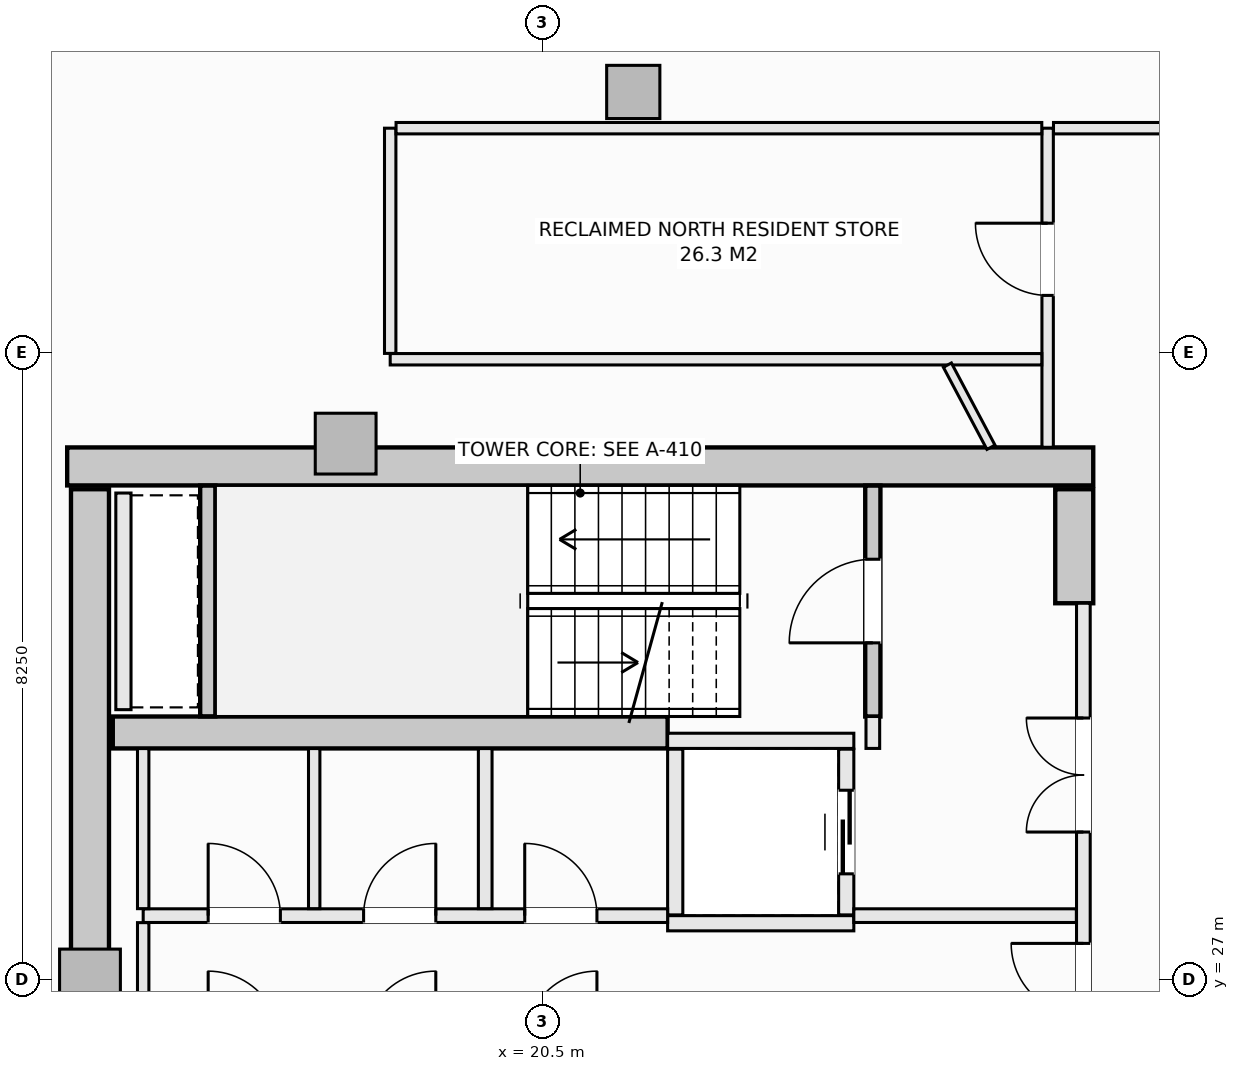
"""IFC4 building model, lengths in metres.
Left out: names, types, materials, properties, quantities, classifications, styles, units other than length and angle.
Written with IfcOpenShell. Run it as: python <this file> out.ifc"""

import sys

from ifc_helpers import new_model, si_unit, direction, frame, frame_2d, origin, origin_2d, place, context, subcontext, project, spatial, rectangle, extrude, element, fill, save


model = new_model("IFC4")
c1 = context("Model", 3, precision=1e-05, world=origin(), true_north=direction((0.0, 1.0)))
c2 = subcontext(c1, "Body", "Model", "MODEL_VIEW")
j1 = project(units=[si_unit("LENGTHUNIT", "METRE"), si_unit("PLANEANGLEUNIT", "RADIAN")], contexts=[c1])
p1 = place(None, origin())
s1 = spatial("IfcSite", under=j1, at=p1, CompositionType="ELEMENT")
p2 = place(p1, origin())
s2 = spatial("IfcBuilding", under=s1, at=p2, CompositionType="ELEMENT")
p3 = place(p2, frame((0.0, 0.0, 216.2)))
s3 = spatial("IfcBuildingStorey", under=s2, at=p3, CompositionType="ELEMENT", Elevation=216.2)
p4 = place(p3, frame((14.25, 33.75, -0.27), z_axis=(0.0, 0.0, 1.0), x_axis=(1.0, 0.0, 0.0)))
e1 = element("IfcWall", 1, at=p4, inside=s3, PredefinedType="SHEAR", context=c2, shape_type="SweptSolid", body=[
    extrude(rectangle(XDim=13.5, YDim=0.5, at=frame_2d((6.75, 0.0))), origin(), (0.0, 0.0, 1.0), 3.3),
])
p5 = place(p3, frame((14.55, 20.55, -0.27), z_axis=(0.0, 0.0, 1.0), x_axis=(0.0, 1.0, 0.0)))
e2 = element("IfcWall", 2, at=p5, inside=s3, PredefinedType="SHEAR", context=c2, shape_type="SweptSolid", body=[
    extrude(rectangle(XDim=12.9, YDim=0.5, at=frame_2d((6.45, 0.0))), origin(), (0.0, 0.0, 1.0), 3.3),
])
p6 = place(p3, frame((27.5, 31.95, -0.27), z_axis=(0.0, 0.0, 1.0), x_axis=(0.0, 1.0, 0.0)))
e3 = element("IfcWall", 3, at=p6, inside=s3, PredefinedType="SHEAR", context=c2, shape_type="SweptSolid", body=[
    extrude(rectangle(XDim=1.5, YDim=0.5, at=frame_2d((0.75, 0.0))), origin(), (0.0, 0.0, 1.0), 3.3),
])
p7 = place(p3, frame((14.85, 30.25, -0.27), z_axis=(0.0, 0.0, 1.0), x_axis=(1.0, 0.0, 0.0)))
e4 = element("IfcWall", 4, at=p7, inside=s3, PredefinedType="SHEAR", context=c2, shape_type="SweptSolid", body=[
    extrude(rectangle(XDim=7.3, YDim=0.42, at=frame_2d((3.65, 0.0))), origin(), (0.0, 0.0, 1.0), 3.3),
])
p8 = place(p3, frame((21.698, 38.677, -0.27), z_axis=(0.0, 0.0, 1.0), x_axis=(1.0, 0.0, 0.0)))
e5 = element("IfcColumn", 5, at=p8, inside=s3, PredefinedType="COLUMN", context=c2, shape_type="SweptSolid", body=[
    extrude(rectangle(XDim=0.7, YDim=0.7, at=origin_2d()), origin(), (0.0, 0.0, 1.0), 3.3),
])
for number, where, z_axis, x_axis in (
    (6, (17.914, 34.05, -0.27), (0.0, 0.0, 1.0), (1.0, 0.0, 0.0)),
    (7, (14.55, 27.0, -0.27), (0.0, 0.0, 1.0), (1.0, 0.0, 0.0)),
):
    element("IfcColumn", number, at=place(p3, frame(where, z_axis=z_axis, x_axis=x_axis)), inside=s3, PredefinedType="PILASTER", context=c2, shape_type="SweptSolid", body=[
        extrude(rectangle(XDim=0.8, YDim=0.8, at=origin_2d()), origin(), (0.0, 0.0, 1.0), 3.3),
    ])
p9 = place(p3, frame((8.691, 36.9, 0.0), z_axis=(0.0, 0.0, 1.0), x_axis=(0.901348331142, 0.433094892545, 0.0)))
e8 = element("IfcWall", 8, at=p9, inside=s3, PredefinedType="SOLIDWALL", context=c2, shape_type="SweptSolid", body=[
    extrude(rectangle(XDim=6.021, YDim=0.3, at=frame_2d((3.01, 0.0))), origin(), (0.0, 0.0, 1.0), 2.605),
])
p10 = place(p9, frame((1.91, 0.0, 0.72)))
e9 = element("IfcOpeningElement", 9, at=p10, cuts=e8, PredefinedType="OPENING", context=c2, shape_type="SweptSolid", body=[
    extrude(rectangle(XDim=2.2, YDim=1.65, at=frame_2d((1.1, 0.825))), frame((0.0, 0.16, 0.0), z_axis=(0.0, -1.0, 0.0), x_axis=(1.0, 0.0, 0.0)), (0.0, 0.0, 1.0), 0.32),
])
p11 = place(p3, frame((24.85, 30.46, -0.27), z_axis=(0.0, 0.0, 1.0), x_axis=(0.0, 1.0, 0.0)))
e10 = element("IfcWall", 10, at=p11, inside=s3, PredefinedType="SHEAR", context=c2, shape_type="SweptSolid", body=[
    extrude(rectangle(XDim=3.038, YDim=0.2, at=frame_2d((1.519, 0.0))), origin(), (0.0, 0.0, 1.0), 3.3),
])
p12 = place(p11, frame((0.969, 0.0, 0.27)))
e11 = element("IfcOpeningElement", 11, at=p12, cuts=e10, PredefinedType="OPENING", context=c2, shape_type="SweptSolid", body=[
    extrude(rectangle(XDim=1.1, YDim=2.15, at=frame_2d((0.55, 1.075))), frame((0.0, 0.11, 0.0), z_axis=(0.0, -1.0, 0.0), x_axis=(1.0, 0.0, 0.0)), (0.0, 0.0, 1.0), 0.22),
])
p13 = place(p3, frame((16.1, 30.462, -0.27), z_axis=(0.0, 0.0, 1.0), x_axis=(0.0, 1.0, 0.0)))
e12 = element("IfcWall", 12, at=p13, inside=s3, PredefinedType="SHEAR", context=c2, shape_type="SweptSolid", body=[
    extrude(rectangle(XDim=3.036, YDim=0.2, at=frame_2d((1.518, 0.0))), origin(), (0.0, 0.0, 1.0), 3.3),
])
for number, where, z_axis, x_axis in (
    (13, (22.15, 30.14, 0.0), (0.0, 0.0, 1.0), (1.0, 0.0, 0.0)),
    (14, (22.15, 27.74, 0.0), (0.0, 0.0, 1.0), (1.0, 0.0, 0.0)),
):
    element("IfcWall", number, at=place(p3, frame(where, z_axis=z_axis, x_axis=x_axis)), inside=s3, PredefinedType="SOLIDWALL", context=c2, shape_type="SweptSolid", body=[
        extrude(rectangle(XDim=2.45, YDim=0.2, at=frame_2d((1.225, 0.0))), origin(), (0.0, 0.0, 1.0), 3.03),
    ])
p14 = place(p3, frame((22.25, 27.85, 0.0), z_axis=(0.0, 0.0, 1.0), x_axis=(0.0, 1.0, 0.0)))
e15 = element("IfcWall", 15, at=p14, inside=s3, PredefinedType="SOLIDWALL", context=c2, shape_type="SweptSolid", body=[
    extrude(rectangle(XDim=2.18, YDim=0.2, at=frame_2d((1.09, 0.0))), origin(), (0.0, 0.0, 1.0), 3.03),
])
p15 = place(p3, frame((24.5, 27.85, 0.0), z_axis=(0.0, 0.0, 1.0), x_axis=(0.0, 1.0, 0.0)))
e16 = element("IfcWall", 16, at=p15, inside=s3, PredefinedType="SOLIDWALL", context=c2, shape_type="SweptSolid", body=[
    extrude(rectangle(XDim=2.18, YDim=0.2, at=frame_2d((1.09, 0.0))), origin(), (0.0, 0.0, 1.0), 3.03),
])
p16 = place(p15, frame((0.54, 0.0, 0.0)))
e17 = element("IfcOpeningElement", 17, at=p16, cuts=e16, PredefinedType="OPENING", context=c2, shape_type="SweptSolid", body=[
    extrude(rectangle(XDim=1.1, YDim=2.2, at=frame_2d((0.55, 1.1))), frame((0.0, 0.11, 0.0), z_axis=(0.0, -1.0, 0.0), x_axis=(1.0, 0.0, 0.0)), (0.0, 0.0, 1.0), 0.22),
])
p17 = place(p3, frame((14.99, 30.55, 0.0), z_axis=(0.0, 0.0, 1.0), x_axis=(0.0, 1.0, 0.0)))
e18 = element("IfcWall", 18, at=p17, inside=s3, PredefinedType="SOLIDWALL", context=c2, shape_type="SweptSolid", body=[
    extrude(rectangle(XDim=2.85, YDim=0.2, at=frame_2d((1.425, 0.0))), origin(), (0.0, 0.0, 1.0), 3.03),
])
p18 = place(p3, frame((24.85, 30.04, 0.0), z_axis=(0.0, 0.0, 1.0), x_axis=(0.0, 1.0, 0.0)))
e19 = element("IfcWall", 19, at=p18, inside=s3, PredefinedType="SOLIDWALL", context=c2, shape_type="SweptSolid", body=[
    extrude(rectangle(XDim=0.42, YDim=0.18, at=frame_2d((0.21, 0.0))), origin(), (0.0, 0.0, 1.0), 3.03),
])
p19 = place(p3, frame((27.62, 22.05, 0.0), z_axis=(0.0, 0.0, 1.0), x_axis=(0.0, 1.0, 0.0)))
e20 = element("IfcWall", 20, at=p19, inside=s3, PredefinedType="SOLIDWALL", context=c2, shape_type="SweptSolid", body=[
    extrude(rectangle(XDim=9.9, YDim=0.18, at=frame_2d((4.95, 0.0))), origin(), (0.0, 0.0, 1.0), 3.03),
])
p20 = place(p19, frame((4.475, 0.0, 0.0)))
e21 = element("IfcOpeningElement", 21, at=p20, cuts=e20, PredefinedType="OPENING", context=c2, shape_type="SweptSolid", body=[
    extrude(rectangle(XDim=0.95, YDim=2.1, at=frame_2d((0.475, 1.05))), frame((0.0, 0.1, 0.0), z_axis=(0.0, -1.0, 0.0), x_axis=(1.0, 0.0, 0.0)), (0.0, 0.0, 1.0), 0.2),
])
p21 = place(p19, frame((6.89, 0.0, 0.0)))
e22 = element("IfcOpeningElement", 22, at=p21, cuts=e20, PredefinedType="OPENING", context=c2, shape_type="SweptSolid", body=[
    extrude(rectangle(XDim=1.5, YDim=2.2, at=frame_2d((0.75, 1.1))), frame((0.0, 0.1, 0.0), z_axis=(0.0, -1.0, 0.0), x_axis=(1.0, 0.0, 0.0)), (0.0, 0.0, 1.0), 0.2),
])
p22 = place(p19, frame((1.51, 0.0, 0.0)))
e23 = element("IfcOpeningElement", 23, at=p22, cuts=e20, PredefinedType="OPENING", context=c2, shape_type="SweptSolid", body=[
    extrude(rectangle(XDim=1.5, YDim=2.2, at=frame_2d((0.75, 1.1))), frame((0.0, 0.1, 0.0), z_axis=(0.0, -1.0, 0.0), x_axis=(1.0, 0.0, 0.0)), (0.0, 0.0, 1.0), 0.2),
])
p23 = place(p3, frame((15.25, 27.84, 0.0), z_axis=(0.0, 0.0, 1.0), x_axis=(1.0, 0.0, 0.0)))
e24 = element("IfcWall", 24, at=p23, inside=s3, PredefinedType="SOLIDWALL", context=c2, shape_type="SweptSolid", body=[
    extrude(rectangle(XDim=6.9, YDim=0.18, at=frame_2d((3.45, 0.0))), origin(), (0.0, 0.0, 1.0), 3.03),
])
p24 = place(p23, frame((5.02, 0.0, 0.0)))
e25 = element("IfcOpeningElement", 25, at=p24, cuts=e24, PredefinedType="OPENING", context=c2, shape_type="SweptSolid", body=[
    extrude(rectangle(XDim=0.95, YDim=2.1, at=frame_2d((0.475, 1.05))), frame((0.0, 0.1, 0.0), z_axis=(0.0, -1.0, 0.0), x_axis=(1.0, 0.0, 0.0)), (0.0, 0.0, 1.0), 0.2),
])
p25 = place(p23, frame((0.855, 0.0, 0.0)))
e26 = element("IfcOpeningElement", 26, at=p25, cuts=e24, PredefinedType="OPENING", context=c2, shape_type="SweptSolid", body=[
    extrude(rectangle(XDim=0.95, YDim=2.1, at=frame_2d((0.475, 1.05))), frame((0.0, 0.1, 0.0), z_axis=(0.0, -1.0, 0.0), x_axis=(1.0, 0.0, 0.0)), (0.0, 0.0, 1.0), 0.2),
])
p26 = place(p23, frame((2.9, 0.0, 0.0)))
e27 = element("IfcOpeningElement", 27, at=p26, cuts=e24, PredefinedType="OPENING", context=c2, shape_type="SweptSolid", body=[
    extrude(rectangle(XDim=0.95, YDim=2.1, at=frame_2d((0.475, 1.05))), frame((0.0, 0.1, 0.0), z_axis=(0.0, -1.0, 0.0), x_axis=(1.0, 0.0, 0.0)), (0.0, 0.0, 1.0), 0.2),
])
p27 = place(p3, frame((24.6, 27.84, 0.0), z_axis=(0.0, 0.0, 1.0), x_axis=(1.0, 0.0, 0.0)))
e28 = element("IfcWall", 28, at=p27, inside=s3, PredefinedType="SOLIDWALL", context=c2, shape_type="SweptSolid", body=[
    extrude(rectangle(XDim=2.928, YDim=0.18, at=frame_2d((1.464, 0.0))), origin(), (0.0, 0.0, 1.0), 3.03),
])
p28 = place(p3, frame((15.25, 26.252, 0.0), z_axis=(0.0, 0.0, 1.0), x_axis=(0.0, 1.0, 0.0)))
e29 = element("IfcWall", 29, at=p28, inside=s3, PredefinedType="PARTITIONING", context=c2, shape_type="SweptSolid", body=[
    extrude(rectangle(XDim=1.496, YDim=0.15, at=frame_2d((0.748, 0.0))), origin(), (0.0, 0.0, 1.0), 3.03),
])
p29 = place(p3, frame((15.25, 27.932, 0.0), z_axis=(0.0, 0.0, 1.0), x_axis=(0.0, 1.0, 0.0)))
e30 = element("IfcWall", 30, at=p29, inside=s3, PredefinedType="PARTITIONING", context=c2, shape_type="SweptSolid", body=[
    extrude(rectangle(XDim=2.106, YDim=0.15, at=frame_2d((1.053, 0.0))), origin(), (0.0, 0.0, 1.0), 3.03),
])
p30 = place(p3, frame((19.75, 27.932, 0.0), z_axis=(0.0, 0.0, 1.0), x_axis=(0.0, 1.0, 0.0)))
e31 = element("IfcWall", 31, at=p30, inside=s3, PredefinedType="SOLIDWALL", context=c2, shape_type="SweptSolid", body=[
    extrude(rectangle(XDim=2.106, YDim=0.18, at=frame_2d((1.053, 0.0))), origin(), (0.0, 0.0, 1.0), 3.03),
])
p31 = place(p3, frame((17.5, 27.932, 0.0), z_axis=(0.0, 0.0, 1.0), x_axis=(0.0, 1.0, 0.0)))
e32 = element("IfcWall", 32, at=p31, inside=s3, PredefinedType="PARTITIONING", context=c2, shape_type="SweptSolid", body=[
    extrude(rectangle(XDim=2.106, YDim=0.15, at=frame_2d((1.053, 0.0))), origin(), (0.0, 0.0, 1.0), 3.03),
])
p32 = place(p3, frame((27.15, 34.002, 0.0), z_axis=(0.0, 0.0, 1.0), x_axis=(0.0, 1.0, 0.0)))
e33 = element("IfcWall", 33, at=p32, inside=s3, PredefinedType="PARTITIONING", context=c2, shape_type="SweptSolid", body=[
    extrude(rectangle(XDim=4.198, YDim=0.15, at=frame_2d((2.099, 0.0))), origin(), (0.0, 0.0, 1.0), 3.03),
])
p33 = place(p32, frame((1.998, 0.0, 0.0)))
e34 = element("IfcOpeningElement", 34, at=p33, cuts=e33, PredefinedType="OPENING", context=c2, shape_type="SweptSolid", body=[
    extrude(rectangle(XDim=0.95, YDim=2.1, at=frame_2d((0.475, 1.05))), frame((0.0, 0.085, 0.0), z_axis=(0.0, -1.0, 0.0), x_axis=(1.0, 0.0, 0.0)), (0.0, 0.0, 1.0), 0.17),
])
p34 = place(p3, frame((18.5, 35.16, 0.0), z_axis=(0.0, 0.0, 1.0), x_axis=(1.0, 0.0, 0.0)))
e35 = element("IfcWall", 35, at=p34, inside=s3, PredefinedType="PARTITIONING", context=c2, shape_type="SweptSolid", body=[
    extrude(rectangle(XDim=8.573, YDim=0.15, at=frame_2d((4.287, 0.0))), origin(), (0.0, 0.0, 1.0), 3.03),
])
p35 = place(p3, frame((18.5, 35.237, 0.0), z_axis=(0.0, 0.0, 1.0), x_axis=(0.0, 1.0, 0.0)))
e36 = element("IfcWall", 36, at=p35, inside=s3, PredefinedType="PARTITIONING", context=c2, shape_type="SweptSolid", body=[
    extrude(rectangle(XDim=2.963, YDim=0.15, at=frame_2d((1.481, 0.0))), origin(), (0.0, 0.0, 1.0), 3.03),
])
p36 = place(p3, frame((18.577, 38.2, 0.0), z_axis=(0.0, 0.0, 1.0), x_axis=(1.0, 0.0, 0.0)))
e37 = element("IfcWall", 37, at=p36, inside=s3, PredefinedType="PARTITIONING", context=c2, shape_type="SweptSolid", body=[
    extrude(rectangle(XDim=8.496, YDim=0.15, at=frame_2d((4.248, 0.0))), origin(), (0.0, 0.0, 1.0), 3.03),
])
p37 = place(p3, frame((27.227, 38.2, 0.0), z_axis=(0.0, 0.0, 1.0), x_axis=(1.0, 0.0, 0.0)))
e38 = element("IfcWall", 38, at=p37, inside=s3, PredefinedType="PARTITIONING", context=c2, shape_type="SweptSolid", body=[
    extrude(rectangle(XDim=2.733, YDim=0.15, at=frame_2d((1.366, 0.0))), origin(), (0.0, 0.0, 1.0), 3.03),
])
p38 = place(p3, frame((25.831, 35.083, 0.0), z_axis=(0.0, 0.0, 1.0), x_axis=(0.468630025993, -0.883394531757, 0.0)))
e39 = element("IfcWall", 39, at=p38, inside=s3, PredefinedType="PARTITIONING", context=c2, shape_type="SweptSolid", body=[
    extrude(rectangle(XDim=1.224, YDim=0.12, at=frame_2d((0.612, 0.0))), origin(), (0.0, 0.0, 1.0), 3.03),
])
p39 = place(p12, origin())
e40 = element("IfcDoor", 40, at=p39, inside=s3, OperationType="SINGLE_SWING_LEFT", PredefinedType="DOOR", context=c2, shape_type="SweptSolid", body=[
    extrude(rectangle(XDim=1.1, YDim=2.15, at=frame_2d((0.55, 1.075))), frame((0.0, 0.025, 0.0), z_axis=(0.0, -1.0, 0.0), x_axis=(1.0, 0.0, 0.0)), (0.0, 0.0, 1.0), 0.05),
])
fill(e11, e40)
p40 = place(p16, origin())
e41 = element("IfcDoor", 41, at=p40, inside=s3, OperationType="SLIDING_TO_LEFT", PredefinedType="DOOR", context=c2, shape_type="SweptSolid", body=[
    extrude(rectangle(XDim=1.1, YDim=2.2, at=frame_2d((0.55, 1.1))), frame((0.0, 0.025, 0.0), z_axis=(0.0, -1.0, 0.0), x_axis=(1.0, 0.0, 0.0)), (0.0, 0.0, 1.0), 0.05),
])
fill(e17, e41)
p41 = place(p20, origin())
e42 = element("IfcDoor", 42, at=p41, inside=s3, OperationType="SINGLE_SWING_RIGHT", PredefinedType="DOOR", context=c2, shape_type="SweptSolid", body=[
    extrude(rectangle(XDim=0.95, YDim=2.1, at=frame_2d((0.475, 1.05))), frame((0.0, 0.025, 0.0), z_axis=(0.0, -1.0, 0.0), x_axis=(1.0, 0.0, 0.0)), (0.0, 0.0, 1.0), 0.05),
])
fill(e21, e42)
p42 = place(p21, origin())
e43 = element("IfcDoor", 43, at=p42, inside=s3, OperationType="DOUBLE_DOOR_SINGLE_SWING", PredefinedType="DOOR", context=c2, shape_type="SweptSolid", body=[
    extrude(rectangle(XDim=1.5, YDim=2.2, at=frame_2d((0.75, 1.1))), frame((0.0, 0.025, 0.0), z_axis=(0.0, -1.0, 0.0), x_axis=(1.0, 0.0, 0.0)), (0.0, 0.0, 1.0), 0.05),
])
fill(e22, e43)
p43 = place(p24, origin())
e44 = element("IfcDoor", 44, at=p43, inside=s3, OperationType="SINGLE_SWING_LEFT", PredefinedType="DOOR", context=c2, shape_type="SweptSolid", body=[
    extrude(rectangle(XDim=0.95, YDim=2.1, at=frame_2d((0.475, 1.05))), frame((0.0, 0.025, 0.0), z_axis=(0.0, -1.0, 0.0), x_axis=(1.0, 0.0, 0.0)), (0.0, 0.0, 1.0), 0.05),
])
fill(e25, e44)
p44 = place(p25, origin())
e45 = element("IfcDoor", 45, at=p44, inside=s3, OperationType="SINGLE_SWING_LEFT", PredefinedType="DOOR", context=c2, shape_type="SweptSolid", body=[
    extrude(rectangle(XDim=0.95, YDim=2.1, at=frame_2d((0.475, 1.05))), frame((0.0, 0.025, 0.0), z_axis=(0.0, -1.0, 0.0), x_axis=(1.0, 0.0, 0.0)), (0.0, 0.0, 1.0), 0.05),
])
fill(e26, e45)
p45 = place(p26, origin())
e46 = element("IfcDoor", 46, at=p45, inside=s3, OperationType="SINGLE_SWING_RIGHT", PredefinedType="DOOR", context=c2, shape_type="SweptSolid", body=[
    extrude(rectangle(XDim=0.95, YDim=2.1, at=frame_2d((0.475, 1.05))), frame((0.0, 0.025, 0.0), z_axis=(0.0, -1.0, 0.0), x_axis=(1.0, 0.0, 0.0)), (0.0, 0.0, 1.0), 0.05),
])
fill(e27, e46)
p46 = place(p33, origin())
e47 = element("IfcDoor", 47, at=p46, inside=s3, OperationType="SINGLE_SWING_RIGHT", PredefinedType="DOOR", context=c2, shape_type="SweptSolid", body=[
    extrude(rectangle(XDim=0.95, YDim=2.1, at=frame_2d((0.475, 1.05))), frame((0.0, 0.025, 0.0), z_axis=(0.0, -1.0, 0.0), x_axis=(1.0, 0.0, 0.0)), (0.0, 0.0, 1.0), 0.05),
])
fill(e34, e47)
save(model, sys.argv[1])
